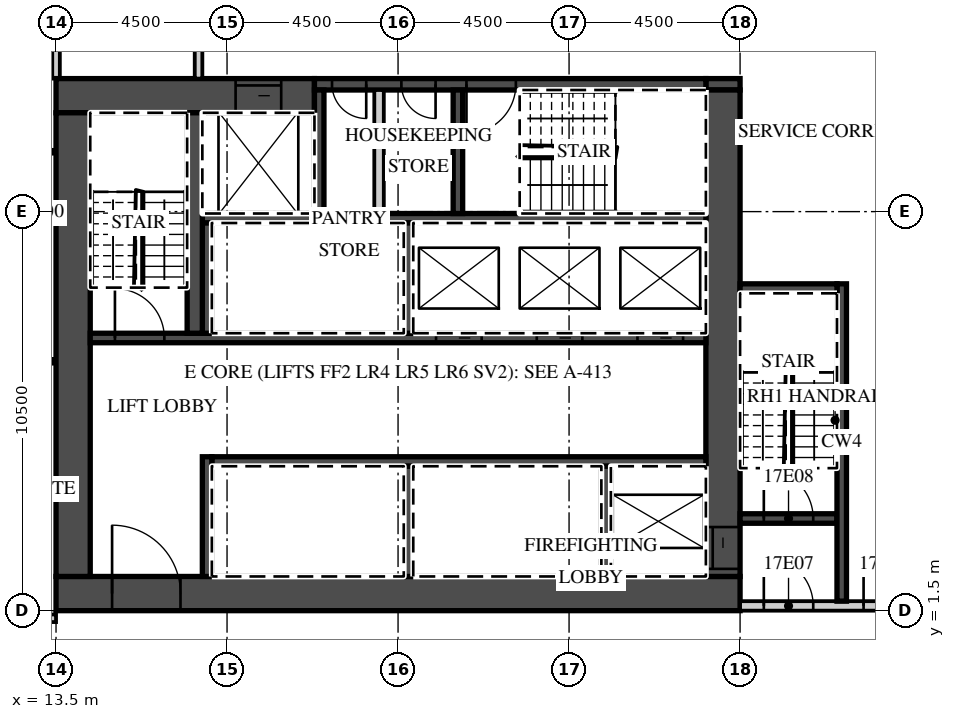
"""IFC4 building model, lengths in metres.
Left out: names, types, materials, properties, quantities, classifications, styles, units other than length and angle.
Written with IfcOpenShell. Run it as: python <this file> out.ifc"""

import sys

from ifc_helpers import new_model, si_unit, direction, frame, frame_2d, origin, place, context, subcontext, project, spatial, rectangle, extrude, element, fill, save


model = new_model("IFC4")
c1 = context("Model", 3, precision=1e-05, world=origin(), true_north=direction((0.0, 1.0)))
c2 = subcontext(c1, "Body", "Model", "MODEL_VIEW")
j1 = project(units=[si_unit("LENGTHUNIT", "METRE"), si_unit("PLANEANGLEUNIT", "RADIAN")], contexts=[c1])
p1 = place(None, origin())
s1 = spatial("IfcSite", under=j1, at=p1, CompositionType="ELEMENT")
p2 = place(p1, origin())
s2 = spatial("IfcBuilding", under=s1, at=p2, CompositionType="ELEMENT")
p3 = place(p2, frame((0.0, 0.0, 86.4)))
s3 = spatial("IfcBuildingStorey", under=s2, at=p3, CompositionType="ELEMENT", Elevation=86.4)
p4 = place(p3, frame((13.5, 15.5, 0.0), z_axis=(0.0, 0.0, 1.0), x_axis=(0.0, 1.0, 0.0)))
e1 = element("IfcWall", 1, at=p4, inside=s3, PredefinedType="PARTITIONING", context=c2, shape_type="SweptSolid", body=[
    extrude(rectangle(XDim=6.05, YDim=0.2, at=frame_2d((3.025, 0.0))), origin(), (0.0, 0.0, 1.0), 3.02),
])
p5 = place(p3, frame((-44.55, 1.3, 0.0), z_axis=(0.0, 0.0, 1.0), x_axis=(1.0, 0.0, 0.0)))
e2 = element("IfcWall", 2, at=p5, inside=s3, PredefinedType="PARTITIONING", context=c2, shape_type="SweptSolid", body=[
    extrude(rectangle(XDim=58.05, YDim=0.2, at=frame_2d((29.025, 0.0))), origin(), (0.0, 0.0, 1.0), 3.02),
])
p6 = place(p5, frame((0.525, 0.0, 0.0)))
e3 = element("IfcOpeningElement", 3, at=p6, cuts=e2, PredefinedType="OPENING", context=c2, shape_type="SweptSolid", body=[
    extrude(rectangle(XDim=1.0, YDim=2.1, at=frame_2d((0.5, 1.05))), frame((0.0, 0.11, 0.0), z_axis=(0.0, -1.0, 0.0), x_axis=(1.0, 0.0, 0.0)), (0.0, 0.0, 1.0), 0.22),
])
p7 = place(p5, frame((6.975, 0.0, 0.0)))
e4 = element("IfcOpeningElement", 4, at=p7, cuts=e2, PredefinedType="OPENING", context=c2, shape_type="SweptSolid", body=[
    extrude(rectangle(XDim=1.0, YDim=2.1, at=frame_2d((0.5, 1.05))), frame((0.0, 0.11, 0.0), z_axis=(0.0, -1.0, 0.0), x_axis=(1.0, 0.0, 0.0)), (0.0, 0.0, 1.0), 0.22),
])
p8 = place(p5, frame((11.5, 0.0, 0.0)))
e5 = element("IfcOpeningElement", 5, at=p8, cuts=e2, PredefinedType="OPENING", context=c2, shape_type="SweptSolid", body=[
    extrude(rectangle(XDim=1.0, YDim=2.1, at=frame_2d((0.5, 1.05))), frame((0.0, 0.11, 0.0), z_axis=(0.0, -1.0, 0.0), x_axis=(1.0, 0.0, 0.0)), (0.0, 0.0, 1.0), 0.22),
])
p9 = place(p5, frame((13.6, 0.0, 0.0)))
e6 = element("IfcOpeningElement", 6, at=p9, cuts=e2, PredefinedType="OPENING", context=c2, shape_type="SweptSolid", body=[
    extrude(rectangle(XDim=1.0, YDim=2.1, at=frame_2d((0.5, 1.05))), frame((0.0, 0.11, 0.0), z_axis=(0.0, -1.0, 0.0), x_axis=(1.0, 0.0, 0.0)), (0.0, 0.0, 1.0), 0.22),
])
p10 = place(p5, frame((22.912, 0.0, 0.0)))
e7 = element("IfcOpeningElement", 7, at=p10, cuts=e2, PredefinedType="OPENING", context=c2, shape_type="SweptSolid", body=[
    extrude(rectangle(XDim=1.2, YDim=2.1, at=frame_2d((0.6, 1.05))), frame((0.0, 0.11, 0.0), z_axis=(0.0, -1.0, 0.0), x_axis=(1.0, 0.0, 0.0)), (0.0, 0.0, 1.0), 0.22),
])
p11 = place(p5, frame((31.912, 0.0, 0.0)))
e8 = element("IfcOpeningElement", 8, at=p11, cuts=e2, PredefinedType="OPENING", context=c2, shape_type="SweptSolid", body=[
    extrude(rectangle(XDim=1.2, YDim=2.1, at=frame_2d((0.6, 1.05))), frame((0.0, 0.11, 0.0), z_axis=(0.0, -1.0, 0.0), x_axis=(1.0, 0.0, 0.0)), (0.0, 0.0, 1.0), 0.22),
])
p12 = place(p5, frame((37.987, 0.0, 0.0)))
e9 = element("IfcOpeningElement", 9, at=p12, cuts=e2, PredefinedType="OPENING", context=c2, shape_type="SweptSolid", body=[
    extrude(rectangle(XDim=1.2, YDim=2.1, at=frame_2d((0.6, 1.05))), frame((0.0, 0.11, 0.0), z_axis=(0.0, -1.0, 0.0), x_axis=(1.0, 0.0, 0.0)), (0.0, 0.0, 1.0), 0.22),
])
p13 = place(p5, frame((46.987, 0.0, 0.0)))
e10 = element("IfcOpeningElement", 10, at=p13, cuts=e2, PredefinedType="OPENING", context=c2, shape_type="SweptSolid", body=[
    extrude(rectangle(XDim=1.2, YDim=2.1, at=frame_2d((0.6, 1.05))), frame((0.0, 0.11, 0.0), z_axis=(0.0, -1.0, 0.0), x_axis=(1.0, 0.0, 0.0)), (0.0, 0.0, 1.0), 0.22),
])
p14 = place(p5, frame((54.125, 0.0, 0.0)))
e11 = element("IfcOpeningElement", 11, at=p14, cuts=e2, PredefinedType="OPENING", context=c2, shape_type="SweptSolid", body=[
    extrude(rectangle(XDim=1.0, YDim=2.1, at=frame_2d((0.5, 1.05))), frame((0.0, 0.11, 0.0), z_axis=(0.0, -1.0, 0.0), x_axis=(1.0, 0.0, 0.0)), (0.0, 0.0, 1.0), 0.22),
])
p15 = place(p3, frame((13.5, 1.95, 0.0), z_axis=(0.0, 0.0, 1.0), x_axis=(1.0, 0.0, 0.0)))
e12 = element("IfcWall", 12, at=p15, inside=s3, PredefinedType="SHEAR", context=c2, shape_type="SweptSolid", body=[
    extrude(rectangle(XDim=18.0, YDim=0.9, at=frame_2d((9.0, 0.0))), origin(), (0.0, 0.0, 1.0), 3.02),
])
p16 = place(p15, frame((1.475, 0.0, 0.0)))
e13 = element("IfcOpeningElement", 13, at=p16, cuts=e12, PredefinedType="OPENING", context=c2, shape_type="SweptSolid", body=[
    extrude(rectangle(XDim=1.8, YDim=2.1, at=frame_2d((0.9, 1.05))), frame((0.0, 0.46, 0.0), z_axis=(0.0, -1.0, 0.0), x_axis=(1.0, 0.0, 0.0)), (0.0, 0.0, 1.0), 0.92),
])
p17 = place(p3, frame((13.5, 15.05, 0.0), z_axis=(0.0, 0.0, 1.0), x_axis=(1.0, 0.0, 0.0)))
e14 = element("IfcWall", 14, at=p17, inside=s3, PredefinedType="SHEAR", context=c2, shape_type="SweptSolid", body=[
    extrude(rectangle(XDim=6.8, YDim=0.9, at=frame_2d((3.4, 0.0))), origin(), (0.0, 0.0, 1.0), 3.02),
])
p18 = place(p17, frame((4.725, 0.0, 0.0)))
e15 = element("IfcOpeningElement", 15, at=p18, cuts=e14, PredefinedType="OPENING", context=c2, shape_type="SweptSolid", body=[
    extrude(rectangle(XDim=1.2, YDim=2.1, at=frame_2d((0.6, 1.05))), frame((0.0, 0.46, 0.0), z_axis=(0.0, -1.0, 0.0), x_axis=(1.0, 0.0, 0.0)), (0.0, 0.0, 1.0), 0.92),
])
p19 = place(p3, frame((30.6, 15.35, 0.0), z_axis=(0.0, 0.0, 1.0), x_axis=(1.0, 0.0, 0.0)))
e16 = element("IfcWall", 16, at=p19, inside=s3, PredefinedType="SHEAR", context=c2, shape_type="SweptSolid", body=[
    extrude(rectangle(XDim=0.9, YDim=0.3, at=frame_2d((0.45, 0.0))), origin(), (0.0, 0.0, 1.0), 3.02),
])
p20 = place(p3, frame((20.3, 15.35, 0.0), z_axis=(0.0, 0.0, 1.0), x_axis=(1.0, 0.0, 0.0)))
e17 = element("IfcWall", 17, at=p20, inside=s3, PredefinedType="SHEAR", context=c2, shape_type="SweptSolid", body=[
    extrude(rectangle(XDim=10.3, YDim=0.3, at=frame_2d((5.15, 0.0))), origin(), (0.0, 0.0, 1.0), 3.02),
])
p21 = place(p20, frame((4.0, 0.0, 0.0)))
e18 = element("IfcOpeningElement", 18, at=p21, cuts=e17, PredefinedType="OPENING", context=c2, shape_type="SweptSolid", body=[
    extrude(rectangle(XDim=1.3, YDim=2.1, at=frame_2d((0.65, 1.05))), frame((0.0, 0.16, 0.0), z_axis=(0.0, -1.0, 0.0), x_axis=(1.0, 0.0, 0.0)), (0.0, 0.0, 1.0), 0.32),
])
p22 = place(p20, frame((2.288, 0.0, 0.0)))
e19 = element("IfcOpeningElement", 19, at=p22, cuts=e17, PredefinedType="OPENING", context=c2, shape_type="SweptSolid", body=[
    extrude(rectangle(XDim=0.9, YDim=2.1, at=frame_2d((0.45, 1.05))), frame((0.0, 0.16, 0.0), z_axis=(0.0, -1.0, 0.0), x_axis=(1.0, 0.0, 0.0)), (0.0, 0.0, 1.0), 0.32),
])
p23 = place(p20, frame((0.462, 0.0, 0.0)))
e20 = element("IfcOpeningElement", 20, at=p23, cuts=e17, PredefinedType="OPENING", context=c2, shape_type="SweptSolid", body=[
    extrude(rectangle(XDim=0.9, YDim=2.1, at=frame_2d((0.45, 1.05))), frame((0.0, 0.16, 0.0), z_axis=(0.0, -1.0, 0.0), x_axis=(1.0, 0.0, 0.0)), (0.0, 0.0, 1.0), 0.32),
])
p24 = place(p3, frame((31.05, 2.4, 0.0), z_axis=(0.0, 0.0, 1.0), x_axis=(0.0, 1.0, 0.0)))
e21 = element("IfcWall", 21, at=p24, inside=s3, PredefinedType="SHEAR", context=c2, shape_type="SweptSolid", body=[
    extrude(rectangle(XDim=12.8, YDim=0.9, at=frame_2d((6.4, 0.0))), origin(), (0.0, 0.0, 1.0), 3.02),
])
p25 = place(p24, frame((0.2, 0.0, 0.0)))
e22 = element("IfcOpeningElement", 22, at=p25, cuts=e21, PredefinedType="OPENING", context=c2, shape_type="SweptSolid", body=[
    extrude(rectangle(XDim=1.1, YDim=2.1, at=frame_2d((0.55, 1.05))), frame((0.0, 0.46, 0.0), z_axis=(0.0, -1.0, 0.0), x_axis=(1.0, 0.0, 0.0)), (0.0, 0.0, 1.0), 0.92),
])
p26 = place(p3, frame((13.95, 2.4, 0.0), z_axis=(0.0, 0.0, 1.0), x_axis=(0.0, 1.0, 0.0)))
e23 = element("IfcWall", 23, at=p26, inside=s3, PredefinedType="SHEAR", context=c2, shape_type="SweptSolid", body=[
    extrude(rectangle(XDim=12.2, YDim=0.9, at=frame_2d((6.1, 0.0))), origin(), (0.0, 0.0, 1.0), 3.02),
])
p27 = place(p3, frame((17.6, 5.425, 0.0), z_axis=(0.0, 0.0, 1.0), x_axis=(1.0, 0.0, 0.0)))
e24 = element("IfcWall", 24, at=p27, inside=s3, PredefinedType="SHEAR", context=c2, shape_type="SweptSolid", body=[
    extrude(rectangle(XDim=13.0, YDim=0.25, at=frame_2d((6.5, 0.0))), origin(), (0.0, 0.0, 1.0), 3.02),
])
p28 = place(p3, frame((17.475, 2.4, 0.0), z_axis=(0.0, 0.0, 1.0), x_axis=(0.0, 1.0, 0.0)))
e25 = element("IfcWall", 25, at=p28, inside=s3, PredefinedType="SHEAR", context=c2, shape_type="SweptSolid", body=[
    extrude(rectangle(XDim=3.15, YDim=0.25, at=frame_2d((1.575, 0.0))), origin(), (0.0, 0.0, 1.0), 3.02),
])
for number, where, z_axis, x_axis in (
    (26, (27.975, 2.4, 0.0), (0.0, 0.0, 1.0), (0.0, 1.0, 0.0)),
    (27, (22.775, 2.4, 0.0), (0.0, 0.0, 1.0), (0.0, 1.0, 0.0)),
):
    element("IfcWall", number, at=place(p3, frame(where, z_axis=z_axis, x_axis=x_axis)), inside=s3, PredefinedType="SHEAR", context=c2, shape_type="SweptSolid", body=[
        extrude(rectangle(XDim=2.9, YDim=0.25, at=frame_2d((1.45, 0.0))), origin(), (0.0, 0.0, 1.0), 3.02),
    ])
p29 = place(p3, frame((14.4, 8.675, 0.0), z_axis=(0.0, 0.0, 1.0), x_axis=(1.0, 0.0, 0.0)))
e28 = element("IfcWall", 28, at=p29, inside=s3, PredefinedType="SHEAR", context=c2, shape_type="SweptSolid", body=[
    extrude(rectangle(XDim=16.2, YDim=0.25, at=frame_2d((8.1, 0.0))), origin(), (0.0, 0.0, 1.0), 3.02),
])
p30 = place(p29, frame((14.4, 0.0, 0.0)))
e29 = element("IfcOpeningElement", 29, at=p30, cuts=e28, PredefinedType="OPENING", context=c2, shape_type="SweptSolid", body=[
    extrude(rectangle(XDim=1.2, YDim=2.1, at=frame_2d((0.6, 1.05))), frame((0.0, 0.135, 0.0), z_axis=(0.0, -1.0, 0.0), x_axis=(1.0, 0.0, 0.0)), (0.0, 0.0, 1.0), 0.27),
])
p31 = place(p29, frame((11.75, 0.0, 0.0)))
e30 = element("IfcOpeningElement", 30, at=p31, cuts=e28, PredefinedType="OPENING", context=c2, shape_type="SweptSolid", body=[
    extrude(rectangle(XDim=1.2, YDim=2.1, at=frame_2d((0.6, 1.05))), frame((0.0, 0.135, 0.0), z_axis=(0.0, -1.0, 0.0), x_axis=(1.0, 0.0, 0.0)), (0.0, 0.0, 1.0), 0.27),
])
p32 = place(p29, frame((9.1, 0.0, 0.0)))
e31 = element("IfcOpeningElement", 31, at=p32, cuts=e28, PredefinedType="OPENING", context=c2, shape_type="SweptSolid", body=[
    extrude(rectangle(XDim=1.2, YDim=2.1, at=frame_2d((0.6, 1.05))), frame((0.0, 0.135, 0.0), z_axis=(0.0, -1.0, 0.0), x_axis=(1.0, 0.0, 0.0)), (0.0, 0.0, 1.0), 0.27),
])
p33 = place(p29, frame((0.65, 0.0, 0.0)))
e32 = element("IfcOpeningElement", 32, at=p33, cuts=e28, PredefinedType="OPENING", context=c2, shape_type="SweptSolid", body=[
    extrude(rectangle(XDim=1.3, YDim=2.1, at=frame_2d((0.65, 1.05))), frame((0.0, 0.135, 0.0), z_axis=(0.0, -1.0, 0.0), x_axis=(1.0, 0.0, 0.0)), (0.0, 0.0, 1.0), 0.27),
])
p34 = place(p3, frame((17.35, 11.825, 0.0), z_axis=(0.0, 0.0, 1.0), x_axis=(1.0, 0.0, 0.0)))
e33 = element("IfcWall", 33, at=p34, inside=s3, PredefinedType="SHEAR", context=c2, shape_type="SweptSolid", body=[
    extrude(rectangle(XDim=13.25, YDim=0.25, at=frame_2d((6.625, 0.0))), origin(), (0.0, 0.0, 1.0), 3.02),
])
for number, where, z_axis, x_axis in (
    (34, (17.475, 8.8, 0.0), (0.0, 0.0, 1.0), (0.0, 1.0, 0.0)),
    (35, (22.775, 8.8, 0.0), (0.0, 0.0, 1.0), (0.0, 1.0, 0.0)),
):
    element("IfcWall", number, at=place(p3, frame(where, z_axis=z_axis, x_axis=x_axis)), inside=s3, PredefinedType="SHEAR", context=c2, shape_type="SweptSolid", body=[
        extrude(rectangle(XDim=2.9, YDim=0.25, at=frame_2d((1.45, 0.0))), origin(), (0.0, 0.0, 1.0), 3.02),
    ])
p35 = place(p3, frame((17.15, 8.8, 0.0), z_axis=(0.0, 0.0, 1.0), x_axis=(0.0, 1.0, 0.0)))
e36 = element("IfcWall", 36, at=p35, inside=s3, PredefinedType="SHEAR", context=c2, shape_type="SweptSolid", body=[
    extrude(rectangle(XDim=5.8, YDim=0.4, at=frame_2d((2.9, 0.0))), origin(), (0.0, 0.0, 1.0), 3.02),
])
for number, where, z_axis, x_axis in (
    (37, (20.425, 11.95, 0.0), (0.0, 0.0, 1.0), (0.0, 1.0, 0.0)),
    (38, (24.075, 11.95, 0.0), (0.0, 0.0, 1.0), (0.0, 1.0, 0.0)),
):
    element("IfcWall", number, at=place(p3, frame(where, z_axis=z_axis, x_axis=x_axis)), inside=s3, PredefinedType="SHEAR", context=c2, shape_type="SweptSolid", body=[
        extrude(rectangle(XDim=3.25, YDim=0.25, at=frame_2d((1.625, 0.0))), origin(), (0.0, 0.0, 1.0), 3.02),
    ])
p36 = place(p3, frame((22.0, 11.95, 0.0), z_axis=(0.0, 0.0, 1.0), x_axis=(0.0, 1.0, 0.0)))
e39 = element("IfcWall", 39, at=p36, inside=s3, PredefinedType="PARTITIONING", context=c2, shape_type="SweptSolid", body=[
    extrude(rectangle(XDim=3.25, YDim=0.25, at=frame_2d((1.625, 0.0))), origin(), (0.0, 0.0, 1.0), 3.02),
])
p37 = place(p3, frame((31.5, 1.625, 0.0), z_axis=(0.0, 0.0, 1.0), x_axis=(1.0, 0.0, 0.0)))
e40 = element("IfcWall", 40, at=p37, inside=s3, PredefinedType="PARTITIONING", context=c2, shape_type="SweptSolid", body=[
    extrude(rectangle(XDim=13.05, YDim=0.25, at=frame_2d((6.525, 0.0))), origin(), (0.0, 0.0, 1.0), 3.02),
])
p38 = place(p37, frame((0.625, 0.0, 0.0)))
e41 = element("IfcOpeningElement", 41, at=p38, cuts=e40, PredefinedType="OPENING", context=c2, shape_type="SweptSolid", body=[
    extrude(rectangle(XDim=1.3, YDim=2.1, at=frame_2d((0.65, 1.05))), frame((0.0, 0.135, 0.0), z_axis=(0.0, -1.0, 0.0), x_axis=(1.0, 0.0, 0.0)), (0.0, 0.0, 1.0), 0.27),
])
p39 = place(p37, frame((3.25, 0.0, 0.0)))
e42 = element("IfcOpeningElement", 42, at=p39, cuts=e40, PredefinedType="OPENING", context=c2, shape_type="SweptSolid", body=[
    extrude(rectangle(XDim=1.1, YDim=2.1, at=frame_2d((0.55, 1.05))), frame((0.0, 0.135, 0.0), z_axis=(0.0, -1.0, 0.0), x_axis=(1.0, 0.0, 0.0)), (0.0, 0.0, 1.0), 0.27),
])
p40 = place(p3, frame((31.5, 3.925, 0.0), z_axis=(0.0, 0.0, 1.0), x_axis=(1.0, 0.0, 0.0)))
e43 = element("IfcWall", 43, at=p40, inside=s3, PredefinedType="SHEAR", context=c2, shape_type="SweptSolid", body=[
    extrude(rectangle(XDim=2.55, YDim=0.25, at=frame_2d((1.275, 0.0))), origin(), (0.0, 0.0, 1.0), 3.02),
])
p41 = place(p40, frame((0.625, 0.0, 0.0)))
e44 = element("IfcOpeningElement", 44, at=p41, cuts=e43, PredefinedType="OPENING", context=c2, shape_type="SweptSolid", body=[
    extrude(rectangle(XDim=1.3, YDim=2.1, at=frame_2d((0.65, 1.05))), frame((0.0, 0.135, 0.0), z_axis=(0.0, -1.0, 0.0), x_axis=(1.0, 0.0, 0.0)), (0.0, 0.0, 1.0), 0.27),
])
p42 = place(p3, frame((34.175, 1.75, 0.0), z_axis=(0.0, 0.0, 1.0), x_axis=(0.0, 1.0, 0.0)))
e45 = element("IfcWall", 45, at=p42, inside=s3, PredefinedType="SHEAR", context=c2, shape_type="SweptSolid", body=[
    extrude(rectangle(XDim=8.35, YDim=0.25, at=frame_2d((4.175, 0.0))), origin(), (0.0, 0.0, 1.0), 3.02),
])
p43 = place(p3, frame((31.5, 9.975, 0.0), z_axis=(0.0, 0.0, 1.0), x_axis=(1.0, 0.0, 0.0)))
e46 = element("IfcWall", 46, at=p43, inside=s3, PredefinedType="SHEAR", context=c2, shape_type="SweptSolid", body=[
    extrude(rectangle(XDim=2.55, YDim=0.25, at=frame_2d((1.275, 0.0))), origin(), (0.0, 0.0, 1.0), 3.02),
])
p44 = place(p3, frame((17.25, 15.5, 0.0), z_axis=(0.0, 0.0, 1.0), x_axis=(0.0, 1.0, 0.0)))
e47 = element("IfcWall", 47, at=p44, inside=s3, PredefinedType="PARTITIONING", context=c2, shape_type="SweptSolid", body=[
    extrude(rectangle(XDim=2.2, YDim=0.2, at=frame_2d((1.1, 0.0))), origin(), (0.0, 0.0, 1.0), 3.02),
])
p45 = place(p30, origin())
e48 = element("IfcDoor", 48, at=p45, inside=s3, OperationType="SLIDING_TO_LEFT", PredefinedType="DOOR", context=c2, shape_type="SweptSolid", body=[
    extrude(rectangle(XDim=1.2, YDim=2.1, at=frame_2d((0.6, 1.05))), frame((0.0, 0.025, 0.0), z_axis=(0.0, -1.0, 0.0), x_axis=(1.0, 0.0, 0.0)), (0.0, 0.0, 1.0), 0.05),
])
fill(e29, e48)
p46 = place(p31, origin())
e49 = element("IfcDoor", 49, at=p46, inside=s3, OperationType="SLIDING_TO_RIGHT", PredefinedType="DOOR", context=c2, shape_type="SweptSolid", body=[
    extrude(rectangle(XDim=1.2, YDim=2.1, at=frame_2d((0.6, 1.05))), frame((0.0, 0.025, 0.0), z_axis=(0.0, -1.0, 0.0), x_axis=(1.0, 0.0, 0.0)), (0.0, 0.0, 1.0), 0.05),
])
fill(e30, e49)
p47 = place(p32, origin())
e50 = element("IfcDoor", 50, at=p47, inside=s3, OperationType="SLIDING_TO_RIGHT", PredefinedType="DOOR", context=c2, shape_type="SweptSolid", body=[
    extrude(rectangle(XDim=1.2, YDim=2.1, at=frame_2d((0.6, 1.05))), frame((0.0, 0.025, 0.0), z_axis=(0.0, -1.0, 0.0), x_axis=(1.0, 0.0, 0.0)), (0.0, 0.0, 1.0), 0.05),
])
fill(e31, e50)
p48 = place(p18, origin())
e51 = element("IfcDoor", 51, at=p48, inside=s3, OperationType="SLIDING_TO_LEFT", PredefinedType="DOOR", context=c2, shape_type="SweptSolid", body=[
    extrude(rectangle(XDim=1.2, YDim=2.1, at=frame_2d((0.6, 1.05))), frame((0.0, 0.025, 0.0), z_axis=(0.0, -1.0, 0.0), x_axis=(1.0, 0.0, 0.0)), (0.0, 0.0, 1.0), 0.05),
])
fill(e15, e51)
p49 = place(p25, origin())
e52 = element("IfcDoor", 52, at=p49, inside=s3, OperationType="SLIDING_TO_LEFT", PredefinedType="DOOR", context=c2, shape_type="SweptSolid", body=[
    extrude(rectangle(XDim=1.1, YDim=2.1, at=frame_2d((0.55, 1.05))), frame((0.0, 0.025, 0.0), z_axis=(0.0, -1.0, 0.0), x_axis=(1.0, 0.0, 0.0)), (0.0, 0.0, 1.0), 0.05),
])
fill(e22, e52)
p50 = place(p16, origin())
e53 = element("IfcDoor", 53, at=p50, inside=s3, OperationType="DOUBLE_DOOR_DOUBLE_SWING", PredefinedType="DOOR", context=c2, shape_type="SweptSolid", body=[
    extrude(rectangle(XDim=1.8, YDim=2.1, at=frame_2d((0.9, 1.05))), frame((0.0, 0.025, 0.0), z_axis=(0.0, -1.0, 0.0), x_axis=(1.0, 0.0, 0.0)), (0.0, 0.0, 1.0), 0.05),
])
fill(e13, e53)
p51 = place(p38, origin())
e54 = element("IfcDoor", 54, at=p51, inside=s3, OperationType="SINGLE_SWING_LEFT", PredefinedType="DOOR", context=c2, shape_type="SweptSolid", body=[
    extrude(rectangle(XDim=1.3, YDim=2.1, at=frame_2d((0.65, 1.05))), frame((0.0, 0.025, 0.0), z_axis=(0.0, -1.0, 0.0), x_axis=(1.0, 0.0, 0.0)), (0.0, 0.0, 1.0), 0.05),
])
fill(e41, e54)
p52 = place(p41, origin())
e55 = element("IfcDoor", 55, at=p52, inside=s3, OperationType="SINGLE_SWING_LEFT", PredefinedType="DOOR", context=c2, shape_type="SweptSolid", body=[
    extrude(rectangle(XDim=1.3, YDim=2.1, at=frame_2d((0.65, 1.05))), frame((0.0, 0.025, 0.0), z_axis=(0.0, -1.0, 0.0), x_axis=(1.0, 0.0, 0.0)), (0.0, 0.0, 1.0), 0.05),
])
fill(e44, e55)
p53 = place(p39, origin())
e56 = element("IfcDoor", 56, at=p53, inside=s3, OperationType="SINGLE_SWING_LEFT", PredefinedType="DOOR", context=c2, shape_type="SweptSolid", body=[
    extrude(rectangle(XDim=1.1, YDim=2.1, at=frame_2d((0.55, 1.05))), frame((0.0, 0.025, 0.0), z_axis=(0.0, -1.0, 0.0), x_axis=(1.0, 0.0, 0.0)), (0.0, 0.0, 1.0), 0.05),
])
fill(e42, e56)
p54 = place(p33, origin())
e57 = element("IfcDoor", 57, at=p54, inside=s3, OperationType="SINGLE_SWING_LEFT", PredefinedType="DOOR", context=c2, shape_type="SweptSolid", body=[
    extrude(rectangle(XDim=1.3, YDim=2.1, at=frame_2d((0.65, 1.05))), frame((0.0, 0.025, 0.0), z_axis=(0.0, -1.0, 0.0), x_axis=(1.0, 0.0, 0.0)), (0.0, 0.0, 1.0), 0.05),
])
fill(e32, e57)
p55 = place(p21, origin())
e58 = element("IfcDoor", 58, at=p55, inside=s3, OperationType="SINGLE_SWING_LEFT", PredefinedType="DOOR", context=c2, shape_type="SweptSolid", body=[
    extrude(rectangle(XDim=1.3, YDim=2.1, at=frame_2d((0.65, 1.05))), frame((0.0, 0.025, 0.0), z_axis=(0.0, -1.0, 0.0), x_axis=(1.0, 0.0, 0.0)), (0.0, 0.0, 1.0), 0.05),
])
fill(e18, e58)
p56 = place(p22, origin())
e59 = element("IfcDoor", 59, at=p56, inside=s3, OperationType="SINGLE_SWING_RIGHT", PredefinedType="DOOR", context=c2, shape_type="SweptSolid", body=[
    extrude(rectangle(XDim=0.9, YDim=2.1, at=frame_2d((0.45, 1.05))), frame((0.0, 0.025, 0.0), z_axis=(0.0, -1.0, 0.0), x_axis=(1.0, 0.0, 0.0)), (0.0, 0.0, 1.0), 0.05),
])
fill(e19, e59)
p57 = place(p23, origin())
e60 = element("IfcDoor", 60, at=p57, inside=s3, OperationType="SINGLE_SWING_RIGHT", PredefinedType="DOOR", context=c2, shape_type="SweptSolid", body=[
    extrude(rectangle(XDim=0.9, YDim=2.1, at=frame_2d((0.45, 1.05))), frame((0.0, 0.025, 0.0), z_axis=(0.0, -1.0, 0.0), x_axis=(1.0, 0.0, 0.0)), (0.0, 0.0, 1.0), 0.05),
])
fill(e20, e60)
save(model, sys.argv[1])
